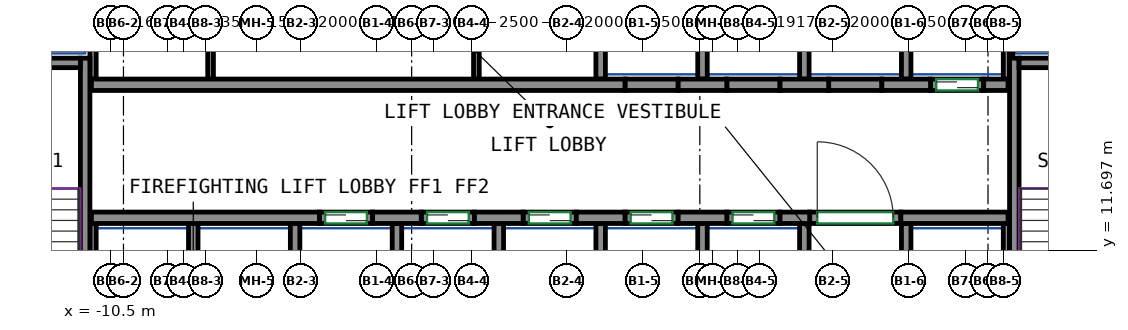
"""IFC4 building model, lengths in metres.
Left out: names, types, materials, properties, quantities, classifications, styles, units other than length and angle.
Written with IfcOpenShell. Run it as: python <this file> out.ifc"""

import sys

from ifc_helpers import new_model, si_unit, direction, frame, frame_2d, origin, place, context, subcontext, project, spatial, rectangle, extrude, source, transform, mapped, element, fill, save


model = new_model("IFC4")
c1 = context("Model", 3, precision=1e-05, world=origin(), true_north=direction((0.0, 1.0)))
c2 = subcontext(c1, "Body", "Model", "MODEL_VIEW")
j1 = project(units=[si_unit("LENGTHUNIT", "METRE"), si_unit("PLANEANGLEUNIT", "RADIAN")], contexts=[c1])
p1 = place(None, origin())
s1 = spatial("IfcSite", under=j1, at=p1, CompositionType="ELEMENT")
p2 = place(p1, origin())
s2 = spatial("IfcBuilding", under=s1, at=p2, CompositionType="ELEMENT")
p3 = place(p2, frame((0.0, 0.0, 206.7)))
s3 = spatial("IfcBuildingStorey", under=s2, at=p3, CompositionType="ELEMENT", Elevation=206.7)
m1 = source(origin(), c2, "Body", "SweptSolid", [
    extrude(rectangle(XDim=7.75, YDim=0.25, at=frame_2d((3.875, 0.0))), origin(), (0.0, 0.0, 1.0), 3.12),
])
p4 = place(p3, frame((-11.175, 9.0, 0.0), z_axis=(0.0, 0.0, 1.0), x_axis=(0.0, 1.0, 0.0)))
e1 = element("IfcWall", 1, at=p4, inside=s3, PredefinedType="SHEAR", context=c2, shape_type="MappedRepresentation", body=[
    mapped(m1, transform((0.0, 0.0, 0.0))),
])
m2 = source(origin(), c2, "Body", "SweptSolid", [
    extrude(rectangle(XDim=3.7, YDim=0.25, at=frame_2d((1.85, 0.0))), origin(), (0.0, 0.0, 1.0), 3.12),
])
p5 = place(p3, frame((-15.0, 16.625, 0.0), z_axis=(0.0, 0.0, 1.0), x_axis=(1.0, 0.0, 0.0)))
e2 = element("IfcWall", 2, at=p5, inside=s3, PredefinedType="SHEAR", context=c2, shape_type="MappedRepresentation", body=[
    mapped(m2, transform((0.0, 0.0, 0.0))),
])
p6 = place(p3, frame((13.275, 9.0, 0.0), z_axis=(0.0, 0.0, 1.0), x_axis=(0.0, 1.0, 0.0)))
e3 = element("IfcWall", 3, at=p6, inside=s3, PredefinedType="SHEAR", context=c2, shape_type="MappedRepresentation", body=[
    mapped(m1, transform((0.0, 0.0, 0.0))),
])
m3 = source(origin(), c2, "Body", "SweptSolid", [
    extrude(rectangle(XDim=3.7, YDim=0.25, at=frame_2d((1.85, 0.0))), origin(), (0.0, 0.0, 1.0), 3.12),
])
p7 = place(p3, frame((13.4, 16.625, 0.0), z_axis=(0.0, 0.0, 1.0), x_axis=(1.0, 0.0, 0.0)))
e4 = element("IfcWall", 4, at=p7, inside=s3, PredefinedType="SHEAR", context=c2, shape_type="MappedRepresentation", body=[
    mapped(m3, transform((0.0, 0.0, 0.0))),
])
m4 = source(origin(), c2, "Body", "SweptSolid", [
    extrude(rectangle(XDim=6.0, YDim=0.3, at=frame_2d((3.0, 0.0))), origin(), (0.0, 0.0, 1.0), 3.12),
])
p8 = place(p3, frame((-11.01, 12.55, 0.0), z_axis=(0.0, 0.0, 1.0), x_axis=(1.0, 0.0, 0.0)))
e5 = element("IfcWall", 5, at=p8, inside=s3, PredefinedType="SHEAR", context=c2, shape_type="MappedRepresentation", body=[
    mapped(m4, transform((0.0, 0.0, 0.0))),
])
m5 = source(origin(), c2, "Body", "SweptSolid", [
    extrude(rectangle(XDim=1.28, YDim=0.3, at=frame_2d((0.64, 0.0))), origin(), (0.0, 0.0, 1.0), 3.12),
])
for number, where, z_axis, x_axis in (
    (6, (-3.61, 12.55, 0.0), (0.0, 0.0, 1.0), (1.0, 0.0, 0.0)),
    (7, (-0.93, 12.55, 0.0), (0.0, 0.0, 1.0), (1.0, 0.0, 0.0)),
    (8, (1.75, 12.55, 0.0), (0.0, 0.0, 1.0), (1.0, 0.0, 0.0)),
    (9, (4.43, 12.55, 0.0), (0.0, 0.0, 1.0), (1.0, 0.0, 0.0)),
):
    element("IfcWall", number, at=place(p3, frame(where, z_axis=z_axis, x_axis=x_axis)), inside=s3, PredefinedType="SHEAR", context=c2, shape_type="MappedRepresentation", body=[
        mapped(m5, transform((0.0, 0.0, 0.0))),
    ])
m6 = source(origin(), c2, "Body", "SweptSolid", [
    extrude(rectangle(XDim=0.78, YDim=0.3, at=frame_2d((0.39, 0.0))), origin(), (0.0, 0.0, 1.0), 3.12),
])
p9 = place(p3, frame((7.11, 12.55, 0.0), z_axis=(0.0, 0.0, 1.0), x_axis=(1.0, 0.0, 0.0)))
e10 = element("IfcWall", 10, at=p9, inside=s3, PredefinedType="SHEAR", context=c2, shape_type="MappedRepresentation", body=[
    mapped(m6, transform((0.0, 0.0, 0.0))),
])
m7 = source(origin(), c2, "Body", "SweptSolid", [
    extrude(rectangle(XDim=2.82, YDim=0.3, at=frame_2d((1.41, 0.0))), origin(), (0.0, 0.0, 1.0), 3.12),
])
p10 = place(p3, frame((10.29, 12.55, 0.0), z_axis=(0.0, 0.0, 1.0), x_axis=(1.0, 0.0, 0.0)))
e11 = element("IfcWall", 11, at=p10, inside=s3, PredefinedType="SHEAR", context=c2, shape_type="MappedRepresentation", body=[
    mapped(m7, transform((0.0, 0.0, 0.0))),
])
m8 = source(origin(), c2, "Body", "SweptSolid", [
    extrude(rectangle(XDim=14.04, YDim=0.3, at=frame_2d((7.02, 0.0))), origin(), (0.0, 0.0, 1.0), 3.12),
])
p11 = place(p3, frame((-11.01, 16.05, 0.0), z_axis=(0.0, 0.0, 1.0), x_axis=(1.0, 0.0, 0.0)))
e12 = element("IfcWall", 12, at=p11, inside=s3, PredefinedType="SHEAR", context=c2, shape_type="MappedRepresentation", body=[
    mapped(m8, transform((0.0, 0.0, 0.0))),
])
p12 = place(p3, frame((4.43, 16.05, 0.0), z_axis=(0.0, 0.0, 1.0), x_axis=(1.0, 0.0, 0.0)))
e13 = element("IfcWall", 13, at=p12, inside=s3, PredefinedType="SHEAR", context=c2, shape_type="MappedRepresentation", body=[
    mapped(m5, transform((0.0, 0.0, 0.0))),
])
m9 = source(origin(), c2, "Body", "SweptSolid", [
    extrude(rectangle(XDim=1.28, YDim=0.3, at=frame_2d((0.64, 0.0))), origin(), (0.0, 0.0, 1.0), 3.12),
])
p13 = place(p3, frame((7.11, 16.05, 0.0), z_axis=(0.0, 0.0, 1.0), x_axis=(1.0, 0.0, 0.0)))
e14 = element("IfcWall", 14, at=p13, inside=s3, PredefinedType="SHEAR", context=c2, shape_type="MappedRepresentation", body=[
    mapped(m9, transform((0.0, 0.0, 0.0))),
])
p14 = place(p3, frame((9.79, 16.05, 0.0), z_axis=(0.0, 0.0, 1.0), x_axis=(1.0, 0.0, 0.0)))
e15 = element("IfcWall", 15, at=p14, inside=s3, PredefinedType="SHEAR", context=c2, shape_type="MappedRepresentation", body=[
    mapped(m5, transform((0.0, 0.0, 0.0))),
])
m10 = source(origin(), c2, "Body", "SweptSolid", [
    extrude(rectangle(XDim=0.64, YDim=0.3, at=frame_2d((0.32, 0.0))), origin(), (0.0, 0.0, 1.0), 3.12),
])
p15 = place(p3, frame((12.47, 16.05, 0.0), z_axis=(0.0, 0.0, 1.0), x_axis=(1.0, 0.0, 0.0)))
e16 = element("IfcWall", 16, at=p15, inside=s3, PredefinedType="SHEAR", context=c2, shape_type="MappedRepresentation", body=[
    mapped(m10, transform((0.0, 0.0, 0.0))),
])
m11 = source(origin(), c2, "Body", "SweptSolid", [
    extrude(rectangle(XDim=1.4, YDim=0.3, at=frame_2d((0.7, 0.0))), origin(), (0.0, 0.0, 1.0), 3.12),
])
p16 = place(p3, frame((-5.01, 12.55, 0.0), z_axis=(0.0, 0.0, 1.0), x_axis=(1.0, 0.0, 0.0)))
e17 = element("IfcWall", 17, at=p16, inside=s3, PredefinedType="PARTITIONING", context=c2, shape_type="MappedRepresentation", body=[
    mapped(m11, transform((0.0, 0.0, 0.0))),
])
p17 = place(p16, frame((0.15, 0.0, 0.0)))
e18 = element("IfcOpeningElement", 18, at=p17, cuts=e17, PredefinedType="OPENING", context=c2, shape_type="SweptSolid", body=[
    extrude(rectangle(XDim=1.1, YDim=2.1, at=frame_2d((0.55, 1.05))), frame((0.0, 0.16, 0.0), z_axis=(0.0, -1.0, 0.0), x_axis=(1.0, 0.0, 0.0)), (0.0, 0.0, 1.0), 0.32),
])
m12 = source(origin(), c2, "Body", "SweptSolid", [
    extrude(rectangle(XDim=1.4, YDim=0.3, at=frame_2d((0.7, 0.0))), origin(), (0.0, 0.0, 1.0), 3.12),
])
p18 = place(p3, frame((-2.33, 12.55, 0.0), z_axis=(0.0, 0.0, 1.0), x_axis=(1.0, 0.0, 0.0)))
e19 = element("IfcWall", 19, at=p18, inside=s3, PredefinedType="PARTITIONING", context=c2, shape_type="MappedRepresentation", body=[
    mapped(m12, transform((0.0, 0.0, 0.0))),
])
p19 = place(p18, frame((0.15, 0.0, 0.0)))
e20 = element("IfcOpeningElement", 20, at=p19, cuts=e19, PredefinedType="OPENING", context=c2, shape_type="SweptSolid", body=[
    extrude(rectangle(XDim=1.1, YDim=2.1, at=frame_2d((0.55, 1.05))), frame((0.0, 0.16, 0.0), z_axis=(0.0, -1.0, 0.0), x_axis=(1.0, 0.0, 0.0)), (0.0, 0.0, 1.0), 0.32),
])
p20 = place(p3, frame((0.35, 12.55, 0.0), z_axis=(0.0, 0.0, 1.0), x_axis=(1.0, 0.0, 0.0)))
e21 = element("IfcWall", 21, at=p20, inside=s3, PredefinedType="PARTITIONING", context=c2, shape_type="MappedRepresentation", body=[
    mapped(m11, transform((0.0, 0.0, 0.0))),
])
p21 = place(p20, frame((0.15, 0.0, 0.0)))
e22 = element("IfcOpeningElement", 22, at=p21, cuts=e21, PredefinedType="OPENING", context=c2, shape_type="SweptSolid", body=[
    extrude(rectangle(XDim=1.1, YDim=2.1, at=frame_2d((0.55, 1.05))), frame((0.0, 0.16, 0.0), z_axis=(0.0, -1.0, 0.0), x_axis=(1.0, 0.0, 0.0)), (0.0, 0.0, 1.0), 0.32),
])
p22 = place(p3, frame((3.03, 12.55, 0.0), z_axis=(0.0, 0.0, 1.0), x_axis=(1.0, 0.0, 0.0)))
e23 = element("IfcWall", 23, at=p22, inside=s3, PredefinedType="PARTITIONING", context=c2, shape_type="MappedRepresentation", body=[
    mapped(m11, transform((0.0, 0.0, 0.0))),
])
p23 = place(p22, frame((0.15, 0.0, 0.0)))
e24 = element("IfcOpeningElement", 24, at=p23, cuts=e23, PredefinedType="OPENING", context=c2, shape_type="SweptSolid", body=[
    extrude(rectangle(XDim=1.1, YDim=2.1, at=frame_2d((0.55, 1.05))), frame((0.0, 0.16, 0.0), z_axis=(0.0, -1.0, 0.0), x_axis=(1.0, 0.0, 0.0)), (0.0, 0.0, 1.0), 0.32),
])
p24 = place(p3, frame((5.71, 12.55, 0.0), z_axis=(0.0, 0.0, 1.0), x_axis=(1.0, 0.0, 0.0)))
e25 = element("IfcWall", 25, at=p24, inside=s3, PredefinedType="PARTITIONING", context=c2, shape_type="MappedRepresentation", body=[
    mapped(m12, transform((0.0, 0.0, 0.0))),
])
p25 = place(p24, frame((0.15, 0.0, 0.0)))
e26 = element("IfcOpeningElement", 26, at=p25, cuts=e25, PredefinedType="OPENING", context=c2, shape_type="SweptSolid", body=[
    extrude(rectangle(XDim=1.1, YDim=2.1, at=frame_2d((0.55, 1.05))), frame((0.0, 0.16, 0.0), z_axis=(0.0, -1.0, 0.0), x_axis=(1.0, 0.0, 0.0)), (0.0, 0.0, 1.0), 0.32),
])
p26 = place(p3, frame((11.07, 16.05, 0.0), z_axis=(0.0, 0.0, 1.0), x_axis=(1.0, 0.0, 0.0)))
e27 = element("IfcWall", 27, at=p26, inside=s3, PredefinedType="PARTITIONING", context=c2, shape_type="MappedRepresentation", body=[
    mapped(m11, transform((0.0, 0.0, 0.0))),
])
p27 = place(p26, frame((0.15, 0.0, 0.0)))
e28 = element("IfcOpeningElement", 28, at=p27, cuts=e27, PredefinedType="OPENING", context=c2, shape_type="SweptSolid", body=[
    extrude(rectangle(XDim=1.1, YDim=2.1, at=frame_2d((0.55, 1.05))), frame((0.0, 0.16, 0.0), z_axis=(0.0, -1.0, 0.0), x_axis=(1.0, 0.0, 0.0)), (0.0, 0.0, 1.0), 0.32),
])
m13 = source(origin(), c2, "Body", "SweptSolid", [
    extrude(rectangle(XDim=2.4, YDim=0.3, at=frame_2d((1.2, 0.0))), origin(), (0.0, 0.0, 1.0), 3.12),
])
p28 = place(p3, frame((7.89, 12.55, 0.0), z_axis=(0.0, 0.0, 1.0), x_axis=(1.0, 0.0, 0.0)))
e29 = element("IfcWall", 29, at=p28, inside=s3, PredefinedType="PARTITIONING", context=c2, shape_type="MappedRepresentation", body=[
    mapped(m13, transform((0.0, 0.0, 0.0))),
])
p29 = place(p28, frame((0.2, 0.0, 0.0)))
e30 = element("IfcOpeningElement", 30, at=p29, cuts=e29, PredefinedType="OPENING", context=c2, shape_type="SweptSolid", body=[
    extrude(rectangle(XDim=2.0, YDim=2.1, at=frame_2d((1.0, 1.05))), frame((0.0, 0.16, 0.0), z_axis=(0.0, -1.0, 0.0), x_axis=(1.0, 0.0, 0.0)), (0.0, 0.0, 1.0), 0.32),
])
p30 = place(p3, frame((3.03, 16.05, 0.0), z_axis=(0.0, 0.0, 1.0), x_axis=(1.0, 0.0, 0.0)))
e31 = element("IfcWall", 31, at=p30, inside=s3, PredefinedType="PARTITIONING", context=c2, shape_type="MappedRepresentation", body=[
    mapped(m11, transform((0.0, 0.0, 0.0))),
])
for number, where, z_axis, x_axis in (
    (32, (5.71, 16.05, 0.0), (0.0, 0.0, 1.0), (1.0, 0.0, 0.0)),
    (33, (8.39, 16.05, 0.0), (0.0, 0.0, 1.0), (1.0, 0.0, 0.0)),
):
    element("IfcWall", number, at=place(p3, frame(where, z_axis=z_axis, x_axis=x_axis)), inside=s3, PredefinedType="PARTITIONING", context=c2, shape_type="MappedRepresentation", body=[
        mapped(m12, transform((0.0, 0.0, 0.0))),
    ])
m14 = source(origin(), c2, "Body", "SweptSolid", [
    extrude(rectangle(XDim=3.275, YDim=0.165, at=frame_2d((1.638, 0.0))), origin(), (0.0, 0.0, 1.0), 3.12),
])
p31 = place(p3, frame((13.067, 16.2, 0.0), z_axis=(0.0, 0.0, 1.0), x_axis=(0.0, 1.0, 0.0)))
e34 = element("IfcWall", 34, at=p31, inside=s3, PredefinedType="PARTITIONING", context=c2, shape_type="MappedRepresentation", body=[
    mapped(m14, transform((0.0, 0.0, 0.0))),
])
m15 = source(origin(), c2, "Body", "SweptSolid", [
    extrude(rectangle(XDim=4.8, YDim=0.165, at=frame_2d((2.4, 0.0))), origin(), (0.0, 0.0, 1.0), 3.12),
])
p32 = place(p3, frame((-10.968, 16.2, 0.0), z_axis=(0.0, 0.0, 1.0), x_axis=(0.0, 1.0, 0.0)))
e35 = element("IfcWall", 35, at=p32, inside=s3, PredefinedType="PARTITIONING", context=c2, shape_type="MappedRepresentation", body=[
    mapped(m15, transform((0.0, 0.0, 0.0))),
])
m16 = source(origin(), c2, "Body", "SweptSolid", [
    extrude(rectangle(XDim=3.275, YDim=0.25, at=frame_2d((1.638, 0.0))), origin(), (0.0, 0.0, 1.0), 3.12),
])
p33 = place(p3, frame((10.43, 16.2, 0.0), z_axis=(0.0, 0.0, 1.0), x_axis=(0.0, 1.0, 0.0)))
e36 = element("IfcWall", 36, at=p33, inside=s3, PredefinedType="PARTITIONING", context=c2, shape_type="MappedRepresentation", body=[
    mapped(m16, transform((0.0, 0.0, 0.0))),
])
m17 = source(origin(), c2, "Body", "SweptSolid", [
    extrude(rectangle(XDim=2.725, YDim=0.085, at=frame_2d((1.363, 0.0))), origin(), (0.0, 0.0, 1.0), 3.12),
])
p34 = place(p3, frame((13.192, 16.75, 0.0), z_axis=(0.0, 0.0, 1.0), x_axis=(0.0, 1.0, 0.0)))
e37 = element("IfcWall", 37, at=p34, inside=s3, PredefinedType="PARTITIONING", context=c2, shape_type="MappedRepresentation", body=[
    mapped(m17, transform((0.0, 0.0, 0.0))),
])
for number, where, z_axis, x_axis in (
    (38, (2.39, 16.2, 0.0), (0.0, 0.0, 1.0), (0.0, 1.0, 0.0)),
    (39, (5.07, 16.2, 0.0), (0.0, 0.0, 1.0), (0.0, 1.0, 0.0)),
    (40, (7.75, 16.2, 0.0), (0.0, 0.0, 1.0), (0.0, 1.0, 0.0)),
):
    element("IfcWall", number, at=place(p3, frame(where, z_axis=z_axis, x_axis=x_axis)), inside=s3, PredefinedType="PARTITIONING", context=c2, shape_type="MappedRepresentation", body=[
        mapped(m16, transform((0.0, 0.0, 0.0))),
    ])
m18 = source(origin(), c2, "Body", "SweptSolid", [
    extrude(rectangle(XDim=3.4, YDim=0.25, at=frame_2d((1.7, 0.0))), origin(), (0.0, 0.0, 1.0), 3.12),
])
p35 = place(p3, frame((10.43, 9.0, 0.0), z_axis=(0.0, 0.0, 1.0), x_axis=(0.0, 1.0, 0.0)))
e41 = element("IfcWall", 41, at=p35, inside=s3, PredefinedType="PARTITIONING", context=c2, shape_type="MappedRepresentation", body=[
    mapped(m18, transform((0.0, 0.0, 0.0))),
])
m19 = source(origin(), c2, "Body", "SweptSolid", [
    extrude(rectangle(XDim=3.4, YDim=0.165, at=frame_2d((1.7, 0.0))), origin(), (0.0, 0.0, 1.0), 3.12),
])
p36 = place(p3, frame((13.067, 9.0, 0.0), z_axis=(0.0, 0.0, 1.0), x_axis=(0.0, 1.0, 0.0)))
e42 = element("IfcWall", 42, at=p36, inside=s3, PredefinedType="PARTITIONING", context=c2, shape_type="MappedRepresentation", body=[
    mapped(m19, transform((0.0, 0.0, 0.0))),
])
for number, where, z_axis, x_axis in (
    (43, (2.39, 9.0, 0.0), (0.0, 0.0, 1.0), (0.0, 1.0, 0.0)),
    (44, (5.07, 9.0, 0.0), (0.0, 0.0, 1.0), (0.0, 1.0, 0.0)),
    (45, (7.75, 9.0, 0.0), (0.0, 0.0, 1.0), (0.0, 1.0, 0.0)),
    (46, (-0.29, 9.0, 0.0), (0.0, 0.0, 1.0), (0.0, 1.0, 0.0)),
):
    element("IfcWall", number, at=place(p3, frame(where, z_axis=z_axis, x_axis=x_axis)), inside=s3, PredefinedType="PARTITIONING", context=c2, shape_type="MappedRepresentation", body=[
        mapped(m18, transform((0.0, 0.0, 0.0))),
    ])
p37 = place(p3, frame((-10.968, 9.0, 0.0), z_axis=(0.0, 0.0, 1.0), x_axis=(0.0, 1.0, 0.0)))
e47 = element("IfcWall", 47, at=p37, inside=s3, PredefinedType="PARTITIONING", context=c2, shape_type="MappedRepresentation", body=[
    mapped(m19, transform((0.0, 0.0, 0.0))),
])
for number, where, z_axis, x_axis in (
    (48, (-2.97, 9.0, 0.0), (0.0, 0.0, 1.0), (0.0, 1.0, 0.0)),
    (49, (-5.65, 9.0, 0.0), (0.0, 0.0, 1.0), (0.0, 1.0, 0.0)),
    (50, (-8.33, 9.0, 0.0), (0.0, 0.0, 1.0), (0.0, 1.0, 0.0)),
):
    element("IfcWall", number, at=place(p3, frame(where, z_axis=z_axis, x_axis=x_axis)), inside=s3, PredefinedType="PARTITIONING", context=c2, shape_type="MappedRepresentation", body=[
        mapped(m18, transform((0.0, 0.0, 0.0))),
    ])
m20 = source(origin(), c2, "Body", "SweptSolid", [
    extrude(rectangle(XDim=4.8, YDim=0.15, at=frame_2d((2.4, 0.0))), origin(), (0.0, 0.0, 1.0), 3.12),
])
for number, where, z_axis, x_axis in (
    (51, (-7.875, 16.2, 0.0), (0.0, 0.0, 1.0), (0.0, 1.0, 0.0)),
    (52, (-0.88, 16.2, 0.0), (0.0, 0.0, 1.0), (0.0, 1.0, 0.0)),
):
    element("IfcWall", number, at=place(p3, frame(where, z_axis=z_axis, x_axis=x_axis)), inside=s3, PredefinedType="PARTITIONING", context=c2, shape_type="MappedRepresentation", body=[
        mapped(m20, transform((0.0, 0.0, 0.0))),
    ])
p38 = place(p29, origin())
e53 = element("IfcDoor", 53, at=p38, inside=s3, OperationType="DOUBLE_DOOR_SINGLE_SWING", PredefinedType="DOOR", context=c2, shape_type="SweptSolid", body=[
    extrude(rectangle(XDim=2.0, YDim=2.1, at=frame_2d((1.0, 1.05))), frame((0.0, 0.025, 0.0), z_axis=(0.0, -1.0, 0.0), x_axis=(1.0, 0.0, 0.0)), (0.0, 0.0, 1.0), 0.05),
])
fill(e30, e53)
p39 = place(p17, origin())
e54 = element("IfcDoor", 54, at=p39, inside=s3, OperationType="DOUBLE_DOOR_SLIDING", PredefinedType="DOOR", context=c2, shape_type="SweptSolid", body=[
    extrude(rectangle(XDim=1.1, YDim=2.1, at=frame_2d((0.55, 1.05))), frame((0.0, 0.025, 0.0), z_axis=(0.0, -1.0, 0.0), x_axis=(1.0, 0.0, 0.0)), (0.0, 0.0, 1.0), 0.05),
])
fill(e18, e54)
p40 = place(p19, origin())
e55 = element("IfcDoor", 55, at=p40, inside=s3, OperationType="DOUBLE_DOOR_SLIDING", PredefinedType="DOOR", context=c2, shape_type="SweptSolid", body=[
    extrude(rectangle(XDim=1.1, YDim=2.1, at=frame_2d((0.55, 1.05))), frame((0.0, 0.025, 0.0), z_axis=(0.0, -1.0, 0.0), x_axis=(1.0, 0.0, 0.0)), (0.0, 0.0, 1.0), 0.05),
])
fill(e20, e55)
p41 = place(p21, origin())
e56 = element("IfcDoor", 56, at=p41, inside=s3, OperationType="DOUBLE_DOOR_SLIDING", PredefinedType="DOOR", context=c2, shape_type="SweptSolid", body=[
    extrude(rectangle(XDim=1.1, YDim=2.1, at=frame_2d((0.55, 1.05))), frame((0.0, 0.025, 0.0), z_axis=(0.0, -1.0, 0.0), x_axis=(1.0, 0.0, 0.0)), (0.0, 0.0, 1.0), 0.05),
])
fill(e22, e56)
p42 = place(p23, origin())
e57 = element("IfcDoor", 57, at=p42, inside=s3, OperationType="DOUBLE_DOOR_SLIDING", PredefinedType="DOOR", context=c2, shape_type="SweptSolid", body=[
    extrude(rectangle(XDim=1.1, YDim=2.1, at=frame_2d((0.55, 1.05))), frame((0.0, 0.025, 0.0), z_axis=(0.0, -1.0, 0.0), x_axis=(1.0, 0.0, 0.0)), (0.0, 0.0, 1.0), 0.05),
])
fill(e24, e57)
p43 = place(p25, origin())
e58 = element("IfcDoor", 58, at=p43, inside=s3, OperationType="DOUBLE_DOOR_SLIDING", PredefinedType="DOOR", context=c2, shape_type="SweptSolid", body=[
    extrude(rectangle(XDim=1.1, YDim=2.1, at=frame_2d((0.55, 1.05))), frame((0.0, 0.025, 0.0), z_axis=(0.0, -1.0, 0.0), x_axis=(1.0, 0.0, 0.0)), (0.0, 0.0, 1.0), 0.05),
])
fill(e26, e58)
p44 = place(p27, origin())
e59 = element("IfcDoor", 59, at=p44, inside=s3, OperationType="DOUBLE_DOOR_SLIDING", PredefinedType="DOOR", context=c2, shape_type="SweptSolid", body=[
    extrude(rectangle(XDim=1.1, YDim=2.1, at=frame_2d((0.55, 1.05))), frame((0.0, 0.025, 0.0), z_axis=(0.0, -1.0, 0.0), x_axis=(1.0, 0.0, 0.0)), (0.0, 0.0, 1.0), 0.05),
])
fill(e28, e59)
save(model, sys.argv[1])
